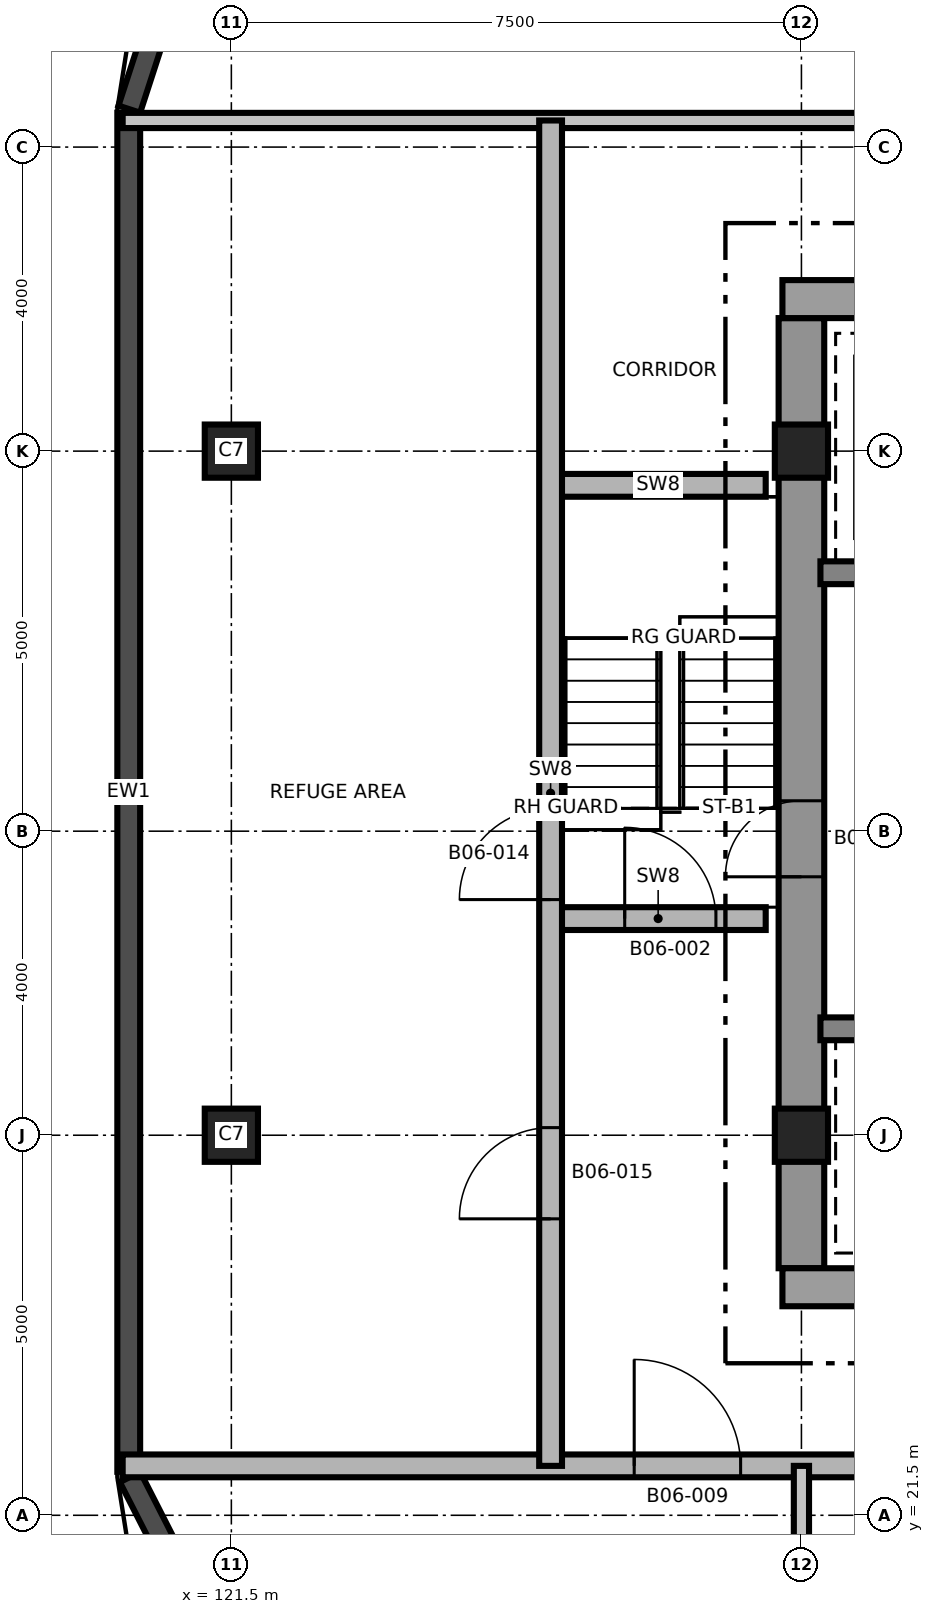
"""IFC4 building model, lengths in metres.
Left out: names, types, materials, properties, quantities, classifications, styles, units other than length and angle.
Written with IfcOpenShell. Run it as: python <this file> out.ifc"""

import sys

from ifc_helpers import new_model, si_unit, direction, frame, frame_2d, origin, origin_2d, place, context, subcontext, project, spatial, rectangle, extrude, element, fill, save


model = new_model("IFC4")
c1 = context("Model", 3, precision=1e-05, world=origin(), true_north=direction((0.0, 1.0)))
c2 = subcontext(c1, "Body", "Model", "MODEL_VIEW")
j1 = project(units=[si_unit("LENGTHUNIT", "METRE"), si_unit("PLANEANGLEUNIT", "RADIAN")], contexts=[c1])
p1 = place(None, origin())
s1 = spatial("IfcSite", under=j1, at=p1, CompositionType="ELEMENT")
p2 = place(p1, origin())
s2 = spatial("IfcBuilding", under=s1, at=p2, CompositionType="ELEMENT")
p3 = place(p2, frame((0.0, 0.0, 81.6)))
s3 = spatial("IfcBuildingStorey", under=s2, at=p3, CompositionType="ELEMENT", Elevation=81.6)
p4 = place(p3, frame((129.0, 24.75, 0.0), z_axis=(0.0, 0.0, 1.0), x_axis=(0.0, 1.0, 0.0)))
e1 = element("IfcWall", 1, at=p4, inside=s3, PredefinedType="SHEAR", context=c2, shape_type="SweptSolid", body=[
    extrude(rectangle(XDim=12.5, YDim=0.6, at=frame_2d((6.25, 0.0))), origin(), (0.0, 0.0, 1.0), 5.5),
])
p5 = place(p4, frame((5.15, 0.0, 0.0)))
e2 = element("IfcOpeningElement", 2, at=p5, cuts=e1, PredefinedType="OPENING", context=c2, shape_type="SweptSolid", body=[
    extrude(rectangle(XDim=1.0, YDim=2.1, at=frame_2d((0.5, 1.05))), frame((0.0, 0.31, 0.0), z_axis=(0.0, -1.0, 0.0), x_axis=(1.0, 0.0, 0.0)), (0.0, 0.0, 1.0), 0.62),
])
p6 = place(p3, frame((128.75, 24.5, 0.0), z_axis=(0.0, 0.0, 1.0), x_axis=(1.0, 0.0, 0.0)))
e3 = element("IfcWall", 3, at=p6, inside=s3, PredefinedType="SHEAR", context=c2, shape_type="SweptSolid", body=[
    extrude(rectangle(XDim=15.0, YDim=0.5, at=frame_2d((7.5, 0.0))), origin(), (0.0, 0.0, 1.0), 5.5),
])
p7 = place(p6, frame((9.65, 0.0, 0.0)))
e4 = element("IfcOpeningElement", 4, at=p7, cuts=e3, PredefinedType="OPENING", context=c2, shape_type="SweptSolid", body=[
    extrude(rectangle(XDim=1.5, YDim=2.1, at=frame_2d((0.75, 1.05))), frame((0.0, 0.26, 0.0), z_axis=(0.0, -1.0, 0.0), x_axis=(1.0, 0.0, 0.0)), (0.0, 0.0, 1.0), 0.52),
])
p8 = place(p6, frame((1.25, 0.0, 0.0)))
e5 = element("IfcOpeningElement", 5, at=p8, cuts=e3, PredefinedType="OPENING", context=c2, shape_type="SweptSolid", body=[
    extrude(rectangle(XDim=0.9, YDim=2.1, at=frame_2d((0.45, 1.05))), frame((0.0, 0.26, 0.0), z_axis=(0.0, -1.0, 0.0), x_axis=(1.0, 0.0, 0.0)), (0.0, 0.0, 1.0), 0.52),
])
p9 = place(p3, frame((128.75, 37.5, 0.0), z_axis=(0.0, 0.0, 1.0), x_axis=(1.0, 0.0, 0.0)))
e6 = element("IfcWall", 6, at=p9, inside=s3, PredefinedType="SHEAR", context=c2, shape_type="SweptSolid", body=[
    extrude(rectangle(XDim=15.0, YDim=0.5, at=frame_2d((7.5, 0.0))), origin(), (0.0, 0.0, 1.0), 5.5),
])
p10 = place(p9, frame((9.65, 0.0, 0.0)))
e7 = element("IfcOpeningElement", 7, at=p10, cuts=e6, PredefinedType="OPENING", context=c2, shape_type="SweptSolid", body=[
    extrude(rectangle(XDim=1.5, YDim=2.1, at=frame_2d((0.75, 1.05))), frame((0.0, 0.26, 0.0), z_axis=(0.0, -1.0, 0.0), x_axis=(1.0, 0.0, 0.0)), (0.0, 0.0, 1.0), 0.52),
])
p11 = place(p9, frame((12.85, 0.0, 0.0)))
e8 = element("IfcOpeningElement", 8, at=p11, cuts=e6, PredefinedType="OPENING", context=c2, shape_type="SweptSolid", body=[
    extrude(rectangle(XDim=0.9, YDim=2.1, at=frame_2d((0.45, 1.05))), frame((0.0, 0.26, 0.0), z_axis=(0.0, -1.0, 0.0), x_axis=(1.0, 0.0, 0.0)), (0.0, 0.0, 1.0), 0.52),
])
p12 = place(p9, frame((3.8, 0.0, 0.0)))
e9 = element("IfcOpeningElement", 9, at=p12, cuts=e6, PredefinedType="OPENING", context=c2, shape_type="SweptSolid", body=[
    extrude(rectangle(XDim=0.9, YDim=2.1, at=frame_2d((0.45, 1.05))), frame((0.0, 0.26, 0.0), z_axis=(0.0, -1.0, 0.0), x_axis=(1.0, 0.0, 0.0)), (0.0, 0.0, 1.0), 0.52),
])
p13 = place(p9, frame((5.8, 0.0, 0.0)))
e10 = element("IfcOpeningElement", 10, at=p13, cuts=e6, PredefinedType="OPENING", context=c2, shape_type="SweptSolid", body=[
    extrude(rectangle(XDim=0.9, YDim=2.1, at=frame_2d((0.45, 1.05))), frame((0.0, 0.26, 0.0), z_axis=(0.0, -1.0, 0.0), x_axis=(1.0, 0.0, 0.0)), (0.0, 0.0, 1.0), 0.52),
])
p14 = place(p9, frame((7.55, 0.0, 0.0)))
e11 = element("IfcOpeningElement", 11, at=p14, cuts=e6, PredefinedType="OPENING", context=c2, shape_type="SweptSolid", body=[
    extrude(rectangle(XDim=0.9, YDim=2.1, at=frame_2d((0.45, 1.05))), frame((0.0, 0.26, 0.0), z_axis=(0.0, -1.0, 0.0), x_axis=(1.0, 0.0, 0.0)), (0.0, 0.0, 1.0), 0.52),
])
p15 = place(p3, frame((129.25, 27.9, 0.0), z_axis=(0.0, 0.0, 1.0), x_axis=(1.0, 0.0, 0.0)))
e12 = element("IfcWall", 12, at=p15, inside=s3, PredefinedType="SHEAR", context=c2, shape_type="SweptSolid", body=[
    extrude(rectangle(XDim=2.7, YDim=0.3, at=frame_2d((1.35, 0.0))), origin(), (0.0, 0.0, 1.0), 5.5),
])
p16 = place(p3, frame((129.25, 33.9, 0.0), z_axis=(0.0, 0.0, 1.0), x_axis=(1.0, 0.0, 0.0)))
e13 = element("IfcWall", 13, at=p16, inside=s3, PredefinedType="SHEAR", context=c2, shape_type="SweptSolid", body=[
    extrude(rectangle(XDim=2.7, YDim=0.3, at=frame_2d((1.35, 0.0))), origin(), (0.0, 0.0, 1.0), 5.5),
])
p17 = place(p16, frame((1.05, 0.0, 0.0)))
e14 = element("IfcOpeningElement", 14, at=p17, cuts=e13, PredefinedType="OPENING", context=c2, shape_type="SweptSolid", body=[
    extrude(rectangle(XDim=1.3, YDim=2.4, at=frame_2d((0.65, 1.2))), frame((0.0, 0.16, 0.0), z_axis=(0.0, -1.0, 0.0), x_axis=(1.0, 0.0, 0.0)), (0.0, 0.0, 1.0), 0.32),
])
for number, where, z_axis, x_axis in (
    (15, (121.5, 26.5, 0.0), (0.0, 0.0, 1.0), (1.0, 0.0, 0.0)),
    (16, (129.0, 26.5, 0.0), (0.0, 0.0, 1.0), (1.0, 0.0, 0.0)),
    (17, (121.5, 35.5, 0.0), (0.0, 0.0, 1.0), (1.0, 0.0, 0.0)),
    (18, (129.0, 35.5, 0.0), (0.0, 0.0, 1.0), (1.0, 0.0, 0.0)),
):
    element("IfcColumn", number, at=place(p3, frame(where, z_axis=z_axis, x_axis=x_axis)), inside=s3, PredefinedType="COLUMN", context=c2, shape_type="SweptSolid", body=[
        extrude(rectangle(XDim=0.7, YDim=0.7, at=origin_2d()), origin(), (0.0, 0.0, 1.0), 5.5),
    ])
p18 = place(p3, frame((120.166, 22.004, 0.0), z_axis=(0.0, 0.0, 1.0), x_axis=(0.454006562826, -0.890998339455, 0.0)))
e19 = element("IfcWall", 19, at=p18, inside=s3, PredefinedType="SOLIDWALL", context=c2, shape_type="SweptSolid", body=[
    extrude(rectangle(XDim=5.252, YDim=0.3, at=frame_2d((2.626, 0.0))), origin(), (0.0, 0.0, 1.0), 5.2),
])
p19 = place(p3, frame((121.25, 43.362, 0.0), z_axis=(0.0, 0.0, 1.0), x_axis=(-0.309073584194, -0.951038127287, 0.0)))
e20 = element("IfcWall", 20, at=p19, inside=s3, PredefinedType="SOLIDWALL", context=c2, shape_type="SweptSolid", body=[
    extrude(rectangle(XDim=3.536, YDim=0.3, at=frame_2d((1.768, 0.0))), origin(), (0.0, 0.0, 1.0), 5.2),
])
p20 = place(p3, frame((120.15, 39.952, 0.0), z_axis=(0.0, 0.0, 1.0), x_axis=(0.0, -1.0, 0.0)))
e21 = element("IfcWall", 21, at=p20, inside=s3, PredefinedType="SOLIDWALL", context=c2, shape_type="SweptSolid", body=[
    extrude(rectangle(XDim=17.88, YDim=0.3, at=frame_2d((8.94, 0.0))), origin(), (0.0, 0.0, 1.0), 5.2),
])
p21 = place(p3, frame((120.07, 22.15, 0.0), z_axis=(0.0, 0.0, 1.0), x_axis=(1.0, 0.0, 0.0)))
e22 = element("IfcWall", 22, at=p21, inside=s3, PredefinedType="SHEAR", context=c2, shape_type="SweptSolid", body=[
    extrude(rectangle(XDim=32.86, YDim=0.3, at=frame_2d((16.43, 0.0))), origin(), (0.0, 0.0, 1.0), 5.2),
])
p22 = place(p21, frame((22.68, 0.0, 0.0)))
e23 = element("IfcOpeningElement", 23, at=p22, cuts=e22, PredefinedType="OPENING", context=c2, shape_type="SweptSolid", body=[
    extrude(rectangle(XDim=1.0, YDim=2.1, at=frame_2d((0.5, 1.05))), frame((0.0, 0.16, 0.0), z_axis=(0.0, -1.0, 0.0), x_axis=(1.0, 0.0, 0.0)), (0.0, 0.0, 1.0), 0.32),
])
p23 = place(p21, frame((6.73, 0.0, 0.0)))
e24 = element("IfcOpeningElement", 24, at=p23, cuts=e22, PredefinedType="OPENING", context=c2, shape_type="SweptSolid", body=[
    extrude(rectangle(XDim=1.4, YDim=2.1, at=frame_2d((0.7, 1.05))), frame((0.0, 0.16, 0.0), z_axis=(0.0, -1.0, 0.0), x_axis=(1.0, 0.0, 0.0)), (0.0, 0.0, 1.0), 0.32),
])
p24 = place(p21, frame((12.23, 0.0, 0.0)))
e25 = element("IfcOpeningElement", 25, at=p24, cuts=e22, PredefinedType="OPENING", context=c2, shape_type="SweptSolid", body=[
    extrude(rectangle(XDim=1.4, YDim=2.1, at=frame_2d((0.7, 1.05))), frame((0.0, 0.16, 0.0), z_axis=(0.0, -1.0, 0.0), x_axis=(1.0, 0.0, 0.0)), (0.0, 0.0, 1.0), 0.32),
])
p25 = place(p21, frame((25.23, 0.0, 0.0)))
e26 = element("IfcOpeningElement", 26, at=p25, cuts=e22, PredefinedType="OPENING", context=c2, shape_type="SweptSolid", body=[
    extrude(rectangle(XDim=1.4, YDim=2.1, at=frame_2d((0.7, 1.05))), frame((0.0, 0.16, 0.0), z_axis=(0.0, -1.0, 0.0), x_axis=(1.0, 0.0, 0.0)), (0.0, 0.0, 1.0), 0.32),
])
p26 = place(p21, frame((16.68, 0.0, 0.0)))
e27 = element("IfcOpeningElement", 27, at=p26, cuts=e22, PredefinedType="OPENING", context=c2, shape_type="SweptSolid", body=[
    extrude(rectangle(XDim=0.9, YDim=2.1, at=frame_2d((0.45, 1.05))), frame((0.0, 0.16, 0.0), z_axis=(0.0, -1.0, 0.0), x_axis=(1.0, 0.0, 0.0)), (0.0, 0.0, 1.0), 0.32),
])
p27 = place(p3, frame((125.7, 29.35, 0.0), z_axis=(0.0, 0.0, 1.0), x_axis=(1.0, 0.0, 0.0)))
e28 = element("IfcWall", 28, at=p27, inside=s3, PredefinedType="SHEAR", context=c2, shape_type="SweptSolid", body=[
    extrude(rectangle(XDim=2.83, YDim=0.3, at=frame_2d((1.415, 0.0))), origin(), (0.0, 0.0, 1.0), 5.2),
])
p28 = place(p27, frame((0.975, 0.0, 0.0)))
e29 = element("IfcOpeningElement", 29, at=p28, cuts=e28, PredefinedType="OPENING", context=c2, shape_type="SweptSolid", body=[
    extrude(rectangle(XDim=1.2, YDim=2.1, at=frame_2d((0.6, 1.05))), frame((0.0, 0.16, 0.0), z_axis=(0.0, -1.0, 0.0), x_axis=(1.0, 0.0, 0.0)), (0.0, 0.0, 1.0), 0.32),
])
p29 = place(p3, frame((125.7, 35.05, 0.0), z_axis=(0.0, 0.0, 1.0), x_axis=(1.0, 0.0, 0.0)))
e30 = element("IfcWall", 30, at=p29, inside=s3, PredefinedType="SHEAR", context=c2, shape_type="SweptSolid", body=[
    extrude(rectangle(XDim=2.83, YDim=0.3, at=frame_2d((1.415, 0.0))), origin(), (0.0, 0.0, 1.0), 5.2),
])
p30 = place(p3, frame((120.07, 39.85, 0.0), z_axis=(0.0, 0.0, 1.0), x_axis=(1.0, 0.0, 0.0)))
e31 = element("IfcWall", 31, at=p30, inside=s3, PredefinedType="PARTITIONING", context=c2, shape_type="SweptSolid", body=[
    extrude(rectangle(XDim=32.86, YDim=0.2, at=frame_2d((16.43, 0.0))), origin(), (0.0, 0.0, 1.0), 5.2),
])
p31 = place(p30, frame((11.23, 0.0, 0.0)))
e32 = element("IfcOpeningElement", 32, at=p31, cuts=e31, PredefinedType="OPENING", context=c2, shape_type="SweptSolid", body=[
    extrude(rectangle(XDim=1.4, YDim=2.1, at=frame_2d((0.7, 1.05))), frame((0.0, 0.11, 0.0), z_axis=(0.0, -1.0, 0.0), x_axis=(1.0, 0.0, 0.0)), (0.0, 0.0, 1.0), 0.22),
])
p32 = place(p30, frame((19.23, 0.0, 0.0)))
e33 = element("IfcOpeningElement", 33, at=p32, cuts=e31, PredefinedType="OPENING", context=c2, shape_type="SweptSolid", body=[
    extrude(rectangle(XDim=1.4, YDim=2.1, at=frame_2d((0.7, 1.05))), frame((0.0, 0.11, 0.0), z_axis=(0.0, -1.0, 0.0), x_axis=(1.0, 0.0, 0.0)), (0.0, 0.0, 1.0), 0.22),
])
p33 = place(p30, frame((24.63, 0.0, 0.0)))
e34 = element("IfcOpeningElement", 34, at=p33, cuts=e31, PredefinedType="OPENING", context=c2, shape_type="SweptSolid", body=[
    extrude(rectangle(XDim=1.4, YDim=2.1, at=frame_2d((0.7, 1.05))), frame((0.0, 0.11, 0.0), z_axis=(0.0, -1.0, 0.0), x_axis=(1.0, 0.0, 0.0)), (0.0, 0.0, 1.0), 0.22),
])
p34 = place(p3, frame((125.7, 22.15, 0.0), z_axis=(0.0, 0.0, 1.0), x_axis=(0.0, 1.0, 0.0)))
e35 = element("IfcWall", 35, at=p34, inside=s3, PredefinedType="SHEAR", context=c2, shape_type="SweptSolid", body=[
    extrude(rectangle(XDim=17.7, YDim=0.3, at=frame_2d((8.85, 0.0))), origin(), (0.0, 0.0, 1.0), 5.2),
])
p35 = place(p34, frame((7.45, 0.0, 0.0)))
e36 = element("IfcOpeningElement", 36, at=p35, cuts=e35, PredefinedType="OPENING", context=c2, shape_type="SweptSolid", body=[
    extrude(rectangle(XDim=1.2, YDim=2.1, at=frame_2d((0.6, 1.05))), frame((0.0, 0.16, 0.0), z_axis=(0.0, -1.0, 0.0), x_axis=(1.0, 0.0, 0.0)), (0.0, 0.0, 1.0), 0.32),
])
p36 = place(p34, frame((3.25, 0.0, 0.0)))
e37 = element("IfcOpeningElement", 37, at=p36, cuts=e35, PredefinedType="OPENING", context=c2, shape_type="SweptSolid", body=[
    extrude(rectangle(XDim=1.2, YDim=2.1, at=frame_2d((0.6, 1.05))), frame((0.0, 0.16, 0.0), z_axis=(0.0, -1.0, 0.0), x_axis=(1.0, 0.0, 0.0)), (0.0, 0.0, 1.0), 0.32),
])
p37 = place(p3, frame((129.0, 16.07, 0.0), z_axis=(0.0, 0.0, 1.0), x_axis=(0.0, 1.0, 0.0)))
e38 = element("IfcWall", 38, at=p37, inside=s3, PredefinedType="PARTITIONING", context=c2, shape_type="SweptSolid", body=[
    extrude(rectangle(XDim=6.08, YDim=0.2, at=frame_2d((3.04, 0.0))), origin(), (0.0, 0.0, 1.0), 5.2),
])
p38 = place(p28, origin())
e39 = element("IfcDoor", 39, at=p38, inside=s3, OperationType="SINGLE_SWING_RIGHT", PredefinedType="DOOR", context=c2, shape_type="SweptSolid", body=[
    extrude(rectangle(XDim=1.2, YDim=2.1, at=frame_2d((0.6, 1.05))), frame((0.0, 0.025, 0.0), z_axis=(0.0, -1.0, 0.0), x_axis=(1.0, 0.0, 0.0)), (0.0, 0.0, 1.0), 0.05),
])
fill(e29, e39)
p39 = place(p23, origin())
e40 = element("IfcDoor", 40, at=p39, inside=s3, OperationType="SINGLE_SWING_LEFT", PredefinedType="DOOR", context=c2, shape_type="SweptSolid", body=[
    extrude(rectangle(XDim=1.4, YDim=2.1, at=frame_2d((0.7, 1.05))), frame((0.0, 0.025, 0.0), z_axis=(0.0, -1.0, 0.0), x_axis=(1.0, 0.0, 0.0)), (0.0, 0.0, 1.0), 0.05),
])
fill(e24, e40)
p40 = place(p35, origin())
e41 = element("IfcDoor", 41, at=p40, inside=s3, OperationType="SINGLE_SWING_RIGHT", PredefinedType="DOOR", context=c2, shape_type="SweptSolid", body=[
    extrude(rectangle(XDim=1.2, YDim=2.1, at=frame_2d((0.6, 1.05))), frame((0.0, 0.025, 0.0), z_axis=(0.0, -1.0, 0.0), x_axis=(1.0, 0.0, 0.0)), (0.0, 0.0, 1.0), 0.05),
])
fill(e36, e41)
p41 = place(p36, origin())
e42 = element("IfcDoor", 42, at=p41, inside=s3, OperationType="SINGLE_SWING_LEFT", PredefinedType="DOOR", context=c2, shape_type="SweptSolid", body=[
    extrude(rectangle(XDim=1.2, YDim=2.1, at=frame_2d((0.6, 1.05))), frame((0.0, 0.025, 0.0), z_axis=(0.0, -1.0, 0.0), x_axis=(1.0, 0.0, 0.0)), (0.0, 0.0, 1.0), 0.05),
])
fill(e37, e42)
p42 = place(p5, origin())
e43 = element("IfcDoor", 43, at=p42, inside=s3, OperationType="SINGLE_SWING_RIGHT", PredefinedType="DOOR", context=c2, shape_type="SweptSolid", body=[
    extrude(rectangle(XDim=1.0, YDim=2.1, at=frame_2d((0.5, 1.05))), frame((0.0, 0.025, 0.0), z_axis=(0.0, -1.0, 0.0), x_axis=(1.0, 0.0, 0.0)), (0.0, 0.0, 1.0), 0.05),
])
fill(e2, e43)
save(model, sys.argv[1])
